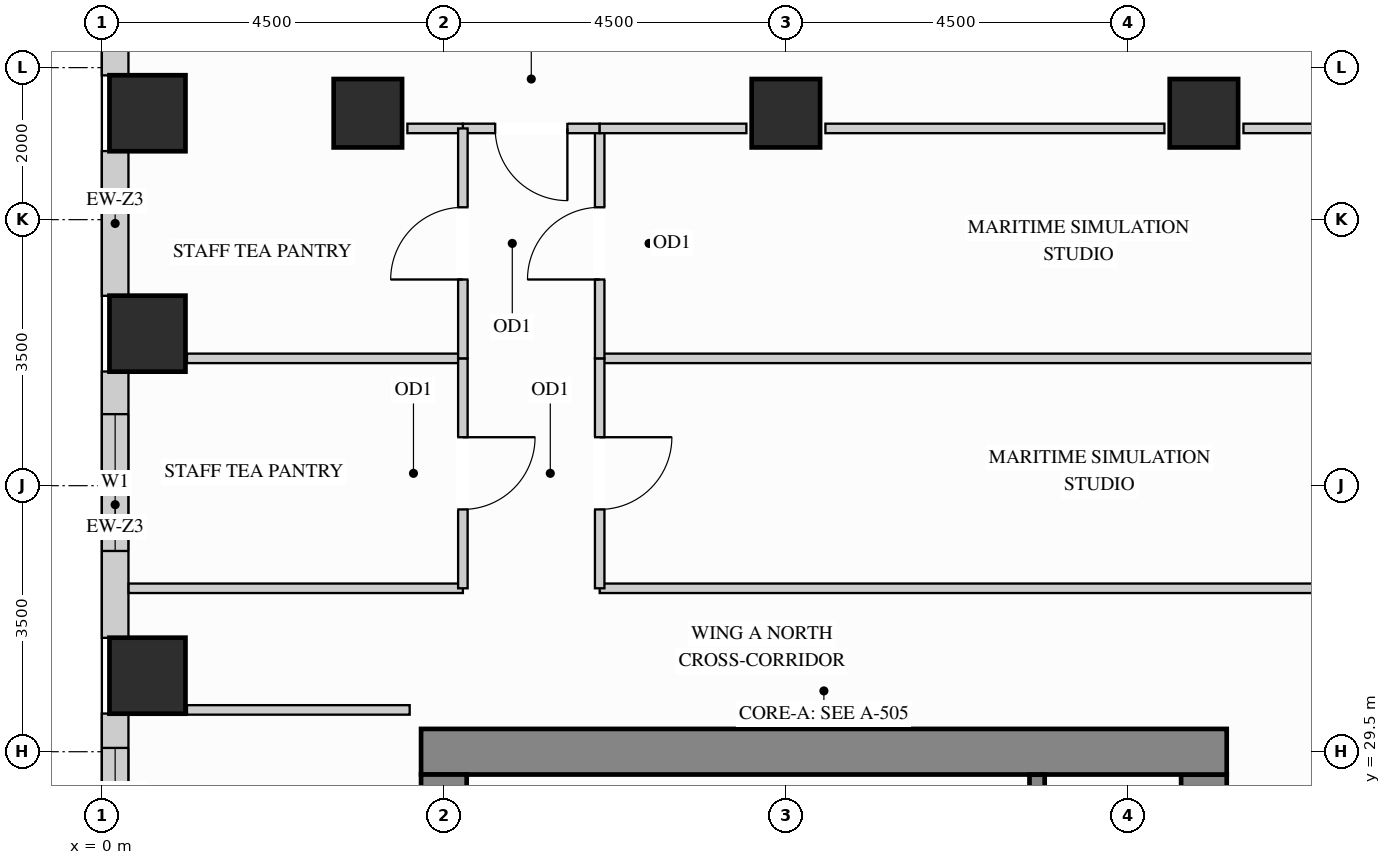
"""IFC4 building model, lengths in metres.
Left out: names, types, materials, properties, quantities, classifications, styles, units other than length and angle.
Written with IfcOpenShell. Run it as: python <this file> out.ifc"""

import sys

from ifc_helpers import new_model, si_unit, direction, frame, frame_2d, origin, origin_2d, place, context, subcontext, project, spatial, rectangle, extrude, source, transform, mapped, element, fill, save


model = new_model("IFC4")
c1 = context("Model", 3, precision=1e-05, world=origin(), true_north=direction((0.0, 1.0)))
c2 = subcontext(c1, "Body", "Model", "MODEL_VIEW")
j1 = project(units=[si_unit("LENGTHUNIT", "METRE"), si_unit("PLANEANGLEUNIT", "RADIAN")], contexts=[c1])
p1 = place(None, origin())
s1 = spatial("IfcSite", under=j1, at=p1, CompositionType="ELEMENT")
p2 = place(p1, origin())
s2 = spatial("IfcBuilding", under=s1, at=p2, CompositionType="ELEMENT")
p3 = place(p2, frame((0.0, 0.0, 168.3)))
s3 = spatial("IfcBuildingStorey", under=s2, at=p3, CompositionType="ELEMENT", Elevation=168.3)
m1 = source(origin(), c2, "Body", "SweptSolid", [
    extrude(rectangle(XDim=0.9, YDim=0.9, at=origin_2d()), origin(), (0.0, 0.0, 1.0), 3.4),
])
for number, where, z_axis, x_axis in (
    (1, (14.5, 37.9, 0.0), (0.0, 0.0, 1.0), (1.0, 0.0, 0.0)),
    (2, (3.5, 37.9, 0.0), (0.0, 0.0, 1.0), (1.0, 0.0, 0.0)),
    (3, (9.0, 37.9, 0.0), (0.0, 0.0, 1.0), (1.0, 0.0, 0.0)),
):
    element("IfcColumn", number, at=place(p3, frame(where, z_axis=z_axis, x_axis=x_axis)), inside=s3, PredefinedType="COLUMN", context=c2, shape_type="MappedRepresentation", body=[
        mapped(m1, transform((0.0, 0.0, 0.0), x_axis=(1.0, 0.0, 0.0), y_axis=(0.0, 1.0, 0.0), z_axis=(0.0, 0.0, 1.0))),
    ])
m2 = source(origin(), c2, "Body", "SweptSolid", [
    extrude(rectangle(XDim=1.0, YDim=1.0, at=origin_2d()), origin(), (0.0, 0.0, 1.0), 3.4),
])
for number, where, z_axis, x_axis in (
    (4, (0.6, 30.5, 0.0), (0.0, 0.0, 1.0), (1.0, 0.0, 0.0)),
    (5, (0.6, 35.0, 0.0), (0.0, 0.0, 1.0), (1.0, 0.0, 0.0)),
    (6, (0.6, 37.9, 0.0), (0.0, 0.0, 1.0), (1.0, 0.0, 0.0)),
):
    element("IfcColumn", number, at=place(p3, frame(where, z_axis=z_axis, x_axis=x_axis)), inside=s3, PredefinedType="COLUMN", context=c2, shape_type="MappedRepresentation", body=[
        mapped(m2, transform((0.0, 0.0, 0.0), x_axis=(1.0, 0.0, 0.0), y_axis=(0.0, 1.0, 0.0), z_axis=(0.0, 0.0, 1.0))),
    ])
m3 = source(origin(), c2, "Body", "SweptSolid", [
    extrude(rectangle(XDim=8.32, YDim=0.6, at=frame_2d((4.16, 0.0))), origin(), (0.0, 0.0, 1.0), 3.4),
])
p4 = place(p3, frame((14.5, 20.88, 0.0), z_axis=(0.0, 0.0, 1.0), x_axis=(0.0, 1.0, 0.0)))
e7 = element("IfcWall", 7, at=p4, inside=s3, PredefinedType="SHEAR", context=c2, shape_type="MappedRepresentation", body=[
    mapped(m3, transform((0.0, 0.0, 0.0), x_axis=(1.0, 0.0, 0.0), y_axis=(0.0, 1.0, 0.0), z_axis=(0.0, 0.0, 1.0))),
])
m4 = source(origin(), c2, "Body", "SweptSolid", [
    extrude(rectangle(XDim=10.6, YDim=0.6, at=frame_2d((5.3, 0.0))), origin(), (0.0, 0.0, 1.0), 3.4),
])
p5 = place(p3, frame((4.2, 29.5, 0.0), z_axis=(0.0, 0.0, 1.0), x_axis=(1.0, 0.0, 0.0)))
e8 = element("IfcWall", 8, at=p5, inside=s3, PredefinedType="SHEAR", context=c2, shape_type="MappedRepresentation", body=[
    mapped(m4, transform((0.0, 0.0, 0.0), x_axis=(1.0, 0.0, 0.0), y_axis=(0.0, 1.0, 0.0), z_axis=(0.0, 0.0, 1.0))),
])
m5 = source(origin(), c2, "Body", "SweptSolid", [
    extrude(rectangle(XDim=20.4, YDim=0.6, at=frame_2d((10.2, 0.0))), origin(), (0.0, 0.0, 1.0), 3.4),
])
p6 = place(p3, frame((4.5, 8.8, 0.0), z_axis=(0.0, 0.0, 1.0), x_axis=(0.0, 1.0, 0.0)))
e9 = element("IfcWall", 9, at=p6, inside=s3, PredefinedType="SHEAR", context=c2, shape_type="MappedRepresentation", body=[
    mapped(m5, transform((0.0, 0.0, 0.0), x_axis=(1.0, 0.0, 0.0), y_axis=(0.0, 1.0, 0.0), z_axis=(0.0, 0.0, 1.0))),
])
m6 = source(origin(), c2, "Body", "SweptSolid", [
    extrude(rectangle(XDim=0.754, YDim=0.35, at=frame_2d((0.377, 0.0))), origin(), (0.0, 0.0, 1.0), 3.385),
])
p7 = place(p3, frame((0.175, 39.152, 0.0), z_axis=(0.0, 0.0, 1.0), x_axis=(0.0, -1.0, 0.0)))
e10 = element("IfcWall", 10, at=p7, inside=s3, PredefinedType="SOLIDWALL", context=c2, shape_type="MappedRepresentation", body=[
    mapped(m6, transform((0.0, 0.0, 0.0), x_axis=(1.0, 0.0, 0.0), y_axis=(0.0, 1.0, 0.0), z_axis=(0.0, 0.0, 1.0))),
])
m7 = source(origin(), c2, "Body", "SweptSolid", [
    extrude(rectangle(XDim=1.904, YDim=0.35, at=frame_2d((0.952, 0.0))), origin(), (0.0, 0.0, 1.0), 2.612),
])
p8 = place(p3, frame((0.175, 37.402, 0.0), z_axis=(0.0, 0.0, 1.0), x_axis=(0.0, -1.0, 0.0)))
e11 = element("IfcWall", 11, at=p8, inside=s3, PredefinedType="SOLIDWALL", context=c2, shape_type="MappedRepresentation", body=[
    mapped(m7, transform((0.0, 0.0, 0.0), x_axis=(1.0, 0.0, 0.0), y_axis=(0.0, 1.0, 0.0), z_axis=(0.0, 0.0, 1.0))),
])
p9 = place(p3, frame((0.175, 34.502, 0.0), z_axis=(0.0, 0.0, 1.0), x_axis=(0.0, -1.0, 0.0)))
e12 = element("IfcWall", 12, at=p9, inside=s3, PredefinedType="SOLIDWALL", context=c2, shape_type="SweptSolid", body=[
    extrude(rectangle(XDim=3.504, YDim=0.35, at=frame_2d((1.752, 0.0))), origin(), (0.0, 0.0, 1.0), 2.612),
])
p10 = place(p9, frame((0.561, 0.0, 0.78)))
e13 = element("IfcOpeningElement", 13, at=p10, cuts=e12, PredefinedType="OPENING", context=c2, shape_type="SweptSolid", body=[
    extrude(rectangle(XDim=1.8, YDim=1.652, at=frame_2d((0.9, 0.826))), frame((0.0, 0.185, 0.0), z_axis=(0.0, -1.0, 0.0), x_axis=(1.0, 0.0, 0.0)), (0.0, 0.0, 1.0), 0.37),
])
p11 = place(p3, frame((0.175, 30.002, 0.0), z_axis=(0.0, 0.0, 1.0), x_axis=(0.0, -1.0, 0.0)))
e14 = element("IfcWall", 14, at=p11, inside=s3, PredefinedType="SOLIDWALL", context=c2, shape_type="SweptSolid", body=[
    extrude(rectangle(XDim=2.704, YDim=0.35, at=frame_2d((1.352, 0.0))), origin(), (0.0, 0.0, 1.0), 2.612),
])
p12 = place(p11, frame((0.452, 0.0, 0.78)))
e15 = element("IfcOpeningElement", 15, at=p12, cuts=e14, PredefinedType="OPENING", context=c2, shape_type="SweptSolid", body=[
    extrude(rectangle(XDim=1.8, YDim=1.652, at=frame_2d((0.9, 0.826))), frame((0.0, 0.185, 0.0), z_axis=(0.0, -1.0, 0.0), x_axis=(1.0, 0.0, 0.0)), (0.0, 0.0, 1.0), 0.37),
])
m8 = source(origin(), c2, "Body", "SweptSolid", [
    extrude(rectangle(XDim=11.93, YDim=0.125, at=frame_2d((5.965, 0.0))), origin(), (0.0, 0.0, 1.0), 2.448),
])
p13 = place(p3, frame((6.55, 34.675, 0.0), z_axis=(0.0, 0.0, 1.0), x_axis=(1.0, 0.0, 0.0)))
e16 = element("IfcWall", 16, at=p13, inside=s3, PredefinedType="PARTITIONING", context=c2, shape_type="MappedRepresentation", body=[
    mapped(m8, transform((0.0, 0.0, 0.0), x_axis=(1.0, 0.0, 0.0), y_axis=(0.0, 1.0, 0.0), z_axis=(0.0, 0.0, 1.0))),
])
m9 = source(origin(), c2, "Body", "SweptSolid", [
    extrude(rectangle(XDim=12.598, YDim=0.125, at=frame_2d((6.299, 0.0))), origin(), (0.0, 0.0, 1.0), 2.848),
])
p14 = place(p3, frame((6.55, 31.65, 0.0), z_axis=(0.0, 0.0, 1.0), x_axis=(1.0, 0.0, 0.0)))
e17 = element("IfcWall", 17, at=p14, inside=s3, PredefinedType="PARTITIONING", context=c2, shape_type="MappedRepresentation", body=[
    mapped(m9, transform((0.0, 0.0, 0.0), x_axis=(1.0, 0.0, 0.0), y_axis=(0.0, 1.0, 0.0), z_axis=(0.0, 0.0, 1.0))),
])
m10 = source(origin(), c2, "Body", "SweptSolid", [
    extrude(rectangle(XDim=4.398, YDim=0.125, at=frame_2d((2.199, 0.0))), origin(), (0.0, 0.0, 1.0), 2.848),
])
p15 = place(p3, frame((0.352, 31.65, 0.0), z_axis=(0.0, 0.0, 1.0), x_axis=(1.0, 0.0, 0.0)))
e18 = element("IfcWall", 18, at=p15, inside=s3, PredefinedType="PARTITIONING", context=c2, shape_type="MappedRepresentation", body=[
    mapped(m10, transform((0.0, 0.0, 0.0), x_axis=(1.0, 0.0, 0.0), y_axis=(0.0, 1.0, 0.0), z_axis=(0.0, 0.0, 1.0))),
])
m11 = source(origin(), c2, "Body", "SweptSolid", [
    extrude(rectangle(XDim=3.63, YDim=0.125, at=frame_2d((1.815, 0.0))), origin(), (0.0, 0.0, 1.0), 2.448),
])
p16 = place(p3, frame((1.12, 34.675, 0.0), z_axis=(0.0, 0.0, 1.0), x_axis=(1.0, 0.0, 0.0)))
e19 = element("IfcWall", 19, at=p16, inside=s3, PredefinedType="PARTITIONING", context=c2, shape_type="MappedRepresentation", body=[
    mapped(m11, transform((0.0, 0.0, 0.0), x_axis=(1.0, 0.0, 0.0), y_axis=(0.0, 1.0, 0.0), z_axis=(0.0, 0.0, 1.0))),
])
m12 = source(origin(), c2, "Body", "SweptSolid", [
    extrude(rectangle(XDim=2.93, YDim=0.125, at=frame_2d((1.465, 0.0))), origin(), (0.0, 0.0, 1.0), 3.385),
])
p17 = place(p3, frame((1.12, 30.05, 0.0), z_axis=(0.0, 0.0, 1.0), x_axis=(1.0, 0.0, 0.0)))
e20 = element("IfcWall", 20, at=p17, inside=s3, PredefinedType="PARTITIONING", context=c2, shape_type="MappedRepresentation", body=[
    mapped(m12, transform((0.0, 0.0, 0.0), x_axis=(1.0, 0.0, 0.0), y_axis=(0.0, 1.0, 0.0), z_axis=(0.0, 0.0, 1.0))),
])
p18 = place(p3, frame((6.55, 31.65, 0.0), z_axis=(0.0, 0.0, 1.0), x_axis=(0.0, 1.0, 0.0)))
e21 = element("IfcWall", 21, at=p18, inside=s3, PredefinedType="PARTITIONING", context=c2, shape_type="SweptSolid", body=[
    extrude(rectangle(XDim=3.025, YDim=0.125, at=frame_2d((1.513, 0.0))), origin(), (0.0, 0.0, 1.0), 3.385),
])
p19 = place(p18, frame((1.038, 0.0, 0.0)))
e22 = element("IfcOpeningElement", 22, at=p19, cuts=e21, PredefinedType="OPENING", context=c2, shape_type="SweptSolid", body=[
    extrude(rectangle(XDim=0.95, YDim=2.15, at=frame_2d((0.475, 1.075))), frame((0.0, 0.073, 0.0), z_axis=(0.0, -1.0, 0.0), x_axis=(1.0, 0.0, 0.0)), (0.0, 0.0, 1.0), 0.145),
])
p20 = place(p3, frame((6.55, 34.675, 0.0), z_axis=(0.0, 0.0, 1.0), x_axis=(0.0, 1.0, 0.0)))
e23 = element("IfcWall", 23, at=p20, inside=s3, PredefinedType="PARTITIONING", context=c2, shape_type="SweptSolid", body=[
    extrude(rectangle(XDim=3.025, YDim=0.125, at=frame_2d((1.512, 0.0))), origin(), (0.0, 0.0, 1.0), 3.385),
])
p21 = place(p20, frame((1.038, 0.0, 0.0)))
e24 = element("IfcOpeningElement", 24, at=p21, cuts=e23, PredefinedType="OPENING", context=c2, shape_type="SweptSolid", body=[
    extrude(rectangle(XDim=0.95, YDim=2.15, at=frame_2d((0.475, 1.075))), frame((0.0, 0.073, 0.0), z_axis=(0.0, -1.0, 0.0), x_axis=(1.0, 0.0, 0.0)), (0.0, 0.0, 1.0), 0.145),
])
p22 = place(p3, frame((4.75, 37.7, 0.0), z_axis=(0.0, 0.0, 1.0), x_axis=(1.0, 0.0, 0.0)))
e25 = element("IfcWall", 25, at=p22, inside=s3, PredefinedType="PARTITIONING", context=c2, shape_type="SweptSolid", body=[
    extrude(rectangle(XDim=1.8, YDim=0.125, at=frame_2d((0.9, 0.0))), origin(), (0.0, 0.0, 1.0), 2.773),
])
p23 = place(p22, frame((0.425, 0.0, 0.0)))
e26 = element("IfcOpeningElement", 26, at=p23, cuts=e25, PredefinedType="OPENING", context=c2, shape_type="SweptSolid", body=[
    extrude(rectangle(XDim=0.95, YDim=2.15, at=frame_2d((0.475, 1.075))), frame((0.0, 0.073, 0.0), z_axis=(0.0, -1.0, 0.0), x_axis=(1.0, 0.0, 0.0)), (0.0, 0.0, 1.0), 0.145),
])
m13 = source(origin(), c2, "Body", "SweptSolid", [
    extrude(rectangle(XDim=1.93, YDim=0.125, at=frame_2d((0.965, 0.0))), origin(), (0.0, 0.0, 1.0), 2.773),
])
p24 = place(p3, frame((6.55, 37.7, 0.0), z_axis=(0.0, 0.0, 1.0), x_axis=(1.0, 0.0, 0.0)))
e27 = element("IfcWall", 27, at=p24, inside=s3, PredefinedType="PARTITIONING", context=c2, shape_type="MappedRepresentation", body=[
    mapped(m13, transform((0.0, 0.0, 0.0), x_axis=(1.0, 0.0, 0.0), y_axis=(0.0, 1.0, 0.0), z_axis=(0.0, 0.0, 1.0))),
])
m14 = source(origin(), c2, "Body", "SweptSolid", [
    extrude(rectangle(XDim=4.46, YDim=0.125, at=frame_2d((2.23, 0.0))), origin(), (0.0, 0.0, 1.0), 2.773),
])
p25 = place(p3, frame((9.52, 37.7, 0.0), z_axis=(0.0, 0.0, 1.0), x_axis=(1.0, 0.0, 0.0)))
e28 = element("IfcWall", 28, at=p25, inside=s3, PredefinedType="PARTITIONING", context=c2, shape_type="MappedRepresentation", body=[
    mapped(m14, transform((0.0, 0.0, 0.0), x_axis=(1.0, 0.0, 0.0), y_axis=(0.0, 1.0, 0.0), z_axis=(0.0, 0.0, 1.0))),
])
m15 = source(origin(), c2, "Body", "SweptSolid", [
    extrude(rectangle(XDim=1.88, YDim=0.125, at=frame_2d((0.94, 0.0))), origin(), (0.0, 0.0, 1.0), 2.773),
])
p26 = place(p3, frame((15.02, 37.7, 0.0), z_axis=(0.0, 0.0, 1.0), x_axis=(1.0, 0.0, 0.0)))
e29 = element("IfcWall", 29, at=p26, inside=s3, PredefinedType="PARTITIONING", context=c2, shape_type="MappedRepresentation", body=[
    mapped(m15, transform((0.0, 0.0, 0.0), x_axis=(1.0, 0.0, 0.0), y_axis=(0.0, 1.0, 0.0), z_axis=(0.0, 0.0, 1.0))),
])
m16 = source(origin(), c2, "Body", "SweptSolid", [
    extrude(rectangle(XDim=0.73, YDim=0.125, at=frame_2d((0.365, 0.0))), origin(), (0.0, 0.0, 1.0), 2.773),
])
p27 = place(p3, frame((4.02, 37.7, 0.0), z_axis=(0.0, 0.0, 1.0), x_axis=(1.0, 0.0, 0.0)))
e30 = element("IfcWall", 30, at=p27, inside=s3, PredefinedType="PARTITIONING", context=c2, shape_type="MappedRepresentation", body=[
    mapped(m16, transform((0.0, 0.0, 0.0), x_axis=(1.0, 0.0, 0.0), y_axis=(0.0, 1.0, 0.0), z_axis=(0.0, 0.0, 1.0))),
])
p28 = place(p3, frame((4.75, 31.65, 0.0), z_axis=(0.0, 0.0, 1.0), x_axis=(0.0, 1.0, 0.0)))
e31 = element("IfcWall", 31, at=p28, inside=s3, PredefinedType="PARTITIONING", context=c2, shape_type="SweptSolid", body=[
    extrude(rectangle(XDim=3.025, YDim=0.125, at=frame_2d((1.513, 0.0))), origin(), (0.0, 0.0, 1.0), 3.385),
])
p29 = place(p28, frame((1.038, 0.0, 0.0)))
e32 = element("IfcOpeningElement", 32, at=p29, cuts=e31, PredefinedType="OPENING", context=c2, shape_type="SweptSolid", body=[
    extrude(rectangle(XDim=0.95, YDim=2.15, at=frame_2d((0.475, 1.075))), frame((0.0, 0.073, 0.0), z_axis=(0.0, -1.0, 0.0), x_axis=(1.0, 0.0, 0.0)), (0.0, 0.0, 1.0), 0.145),
])
p30 = place(p3, frame((4.75, 34.675, 0.0), z_axis=(0.0, 0.0, 1.0), x_axis=(0.0, 1.0, 0.0)))
e33 = element("IfcWall", 33, at=p30, inside=s3, PredefinedType="PARTITIONING", context=c2, shape_type="SweptSolid", body=[
    extrude(rectangle(XDim=3.025, YDim=0.125, at=frame_2d((1.512, 0.0))), origin(), (0.0, 0.0, 1.0), 3.385),
])
p31 = place(p30, frame((1.038, 0.0, 0.0)))
e34 = element("IfcOpeningElement", 34, at=p31, cuts=e33, PredefinedType="OPENING", context=c2, shape_type="SweptSolid", body=[
    extrude(rectangle(XDim=0.95, YDim=2.15, at=frame_2d((0.475, 1.075))), frame((0.0, 0.073, 0.0), z_axis=(0.0, -1.0, 0.0), x_axis=(1.0, 0.0, 0.0)), (0.0, 0.0, 1.0), 0.145),
])
m17 = source(origin(), c2, "Body", "SweptSolid", [
    extrude(rectangle(XDim=3.753, YDim=0.2, at=frame_2d((1.876, 0.0))), origin(), (0.0, 0.0, 1.0), 3.4),
])
p32 = place(p3, frame((12.305, 25.445, 0.0), z_axis=(0.0, 0.0, 1.0), x_axis=(0.0, 1.0, 0.0)))
e35 = element("IfcWall", 35, at=p32, inside=s3, PredefinedType="SHEAR", context=c2, shape_type="MappedRepresentation", body=[
    mapped(m17, transform((0.0, 0.0, 0.0), x_axis=(1.0, 0.0, 0.0), y_axis=(0.0, 1.0, 0.0), z_axis=(0.0, 0.0, 1.0))),
])
m18 = source(origin(), c2, "Body", "SweptSolid", [
    extrude(rectangle(XDim=0.95, YDim=2.15, at=frame_2d((0.475, 1.075))), frame((0.0, 0.025, 0.0), z_axis=(0.0, -1.0, 0.0), x_axis=(1.0, 0.0, 0.0)), (0.0, 0.0, 1.0), 0.05),
])
p33 = place(p19, origin())
e36 = element("IfcDoor", 36, at=p33, inside=s3, OperationType="SINGLE_SWING_RIGHT", PredefinedType="DOOR", context=c2, shape_type="MappedRepresentation", body=[
    mapped(m18, transform((0.0, 0.0, 0.0), x_axis=(1.0, 0.0, 0.0), y_axis=(0.0, 1.0, 0.0), z_axis=(0.0, 0.0, 1.0))),
])
fill(e22, e36)
p34 = place(p21, origin())
e37 = element("IfcDoor", 37, at=p34, inside=s3, OperationType="SINGLE_SWING_LEFT", PredefinedType="DOOR", context=c2, shape_type="MappedRepresentation", body=[
    mapped(m18, transform((0.0, 0.0, 0.0), x_axis=(1.0, 0.0, 0.0), y_axis=(0.0, 1.0, 0.0), z_axis=(0.0, 0.0, 1.0))),
])
fill(e24, e37)
p35 = place(p23, origin())
e38 = element("IfcDoor", 38, at=p35, inside=s3, OperationType="SINGLE_SWING_RIGHT", PredefinedType="DOOR", context=c2, shape_type="MappedRepresentation", body=[
    mapped(m18, transform((0.0, 0.0, 0.0), x_axis=(1.0, 0.0, 0.0), y_axis=(0.0, 1.0, 0.0), z_axis=(0.0, 0.0, 1.0))),
])
fill(e26, e38)
p36 = place(p29, origin())
e39 = element("IfcDoor", 39, at=p36, inside=s3, OperationType="SINGLE_SWING_RIGHT", PredefinedType="DOOR", context=c2, shape_type="MappedRepresentation", body=[
    mapped(m18, transform((0.0, 0.0, 0.0), x_axis=(1.0, 0.0, 0.0), y_axis=(0.0, 1.0, 0.0), z_axis=(0.0, 0.0, 1.0))),
])
fill(e32, e39)
p37 = place(p31, origin())
e40 = element("IfcDoor", 40, at=p37, inside=s3, OperationType="SINGLE_SWING_LEFT", PredefinedType="DOOR", context=c2, shape_type="MappedRepresentation", body=[
    mapped(m18, transform((0.0, 0.0, 0.0), x_axis=(1.0, 0.0, 0.0), y_axis=(0.0, 1.0, 0.0), z_axis=(0.0, 0.0, 1.0))),
])
fill(e34, e40)
m19 = source(origin(), c2, "Body", "SweptSolid", [
    extrude(rectangle(XDim=1.8, YDim=1.652, at=frame_2d((0.9, 0.826))), frame((0.0, 0.03, 0.0), z_axis=(0.0, -1.0, 0.0), x_axis=(1.0, 0.0, 0.0)), (0.0, 0.0, 1.0), 0.06),
])
p38 = place(p10, origin())
e41 = element("IfcWindow", 41, at=p38, inside=s3, PartitioningType="SINGLE_PANEL", PredefinedType="WINDOW", context=c2, shape_type="MappedRepresentation", body=[
    mapped(m19, transform((0.0, 0.0, 0.0), x_axis=(1.0, 0.0, 0.0), y_axis=(0.0, 1.0, 0.0), z_axis=(0.0, 0.0, 1.0))),
])
fill(e13, e41)
p39 = place(p12, origin())
e42 = element("IfcWindow", 42, at=p39, inside=s3, PartitioningType="SINGLE_PANEL", PredefinedType="WINDOW", context=c2, shape_type="MappedRepresentation", body=[
    mapped(m19, transform((0.0, 0.0, 0.0), x_axis=(1.0, 0.0, 0.0), y_axis=(0.0, 1.0, 0.0), z_axis=(0.0, 0.0, 1.0))),
])
fill(e15, e42)
save(model, sys.argv[1])
